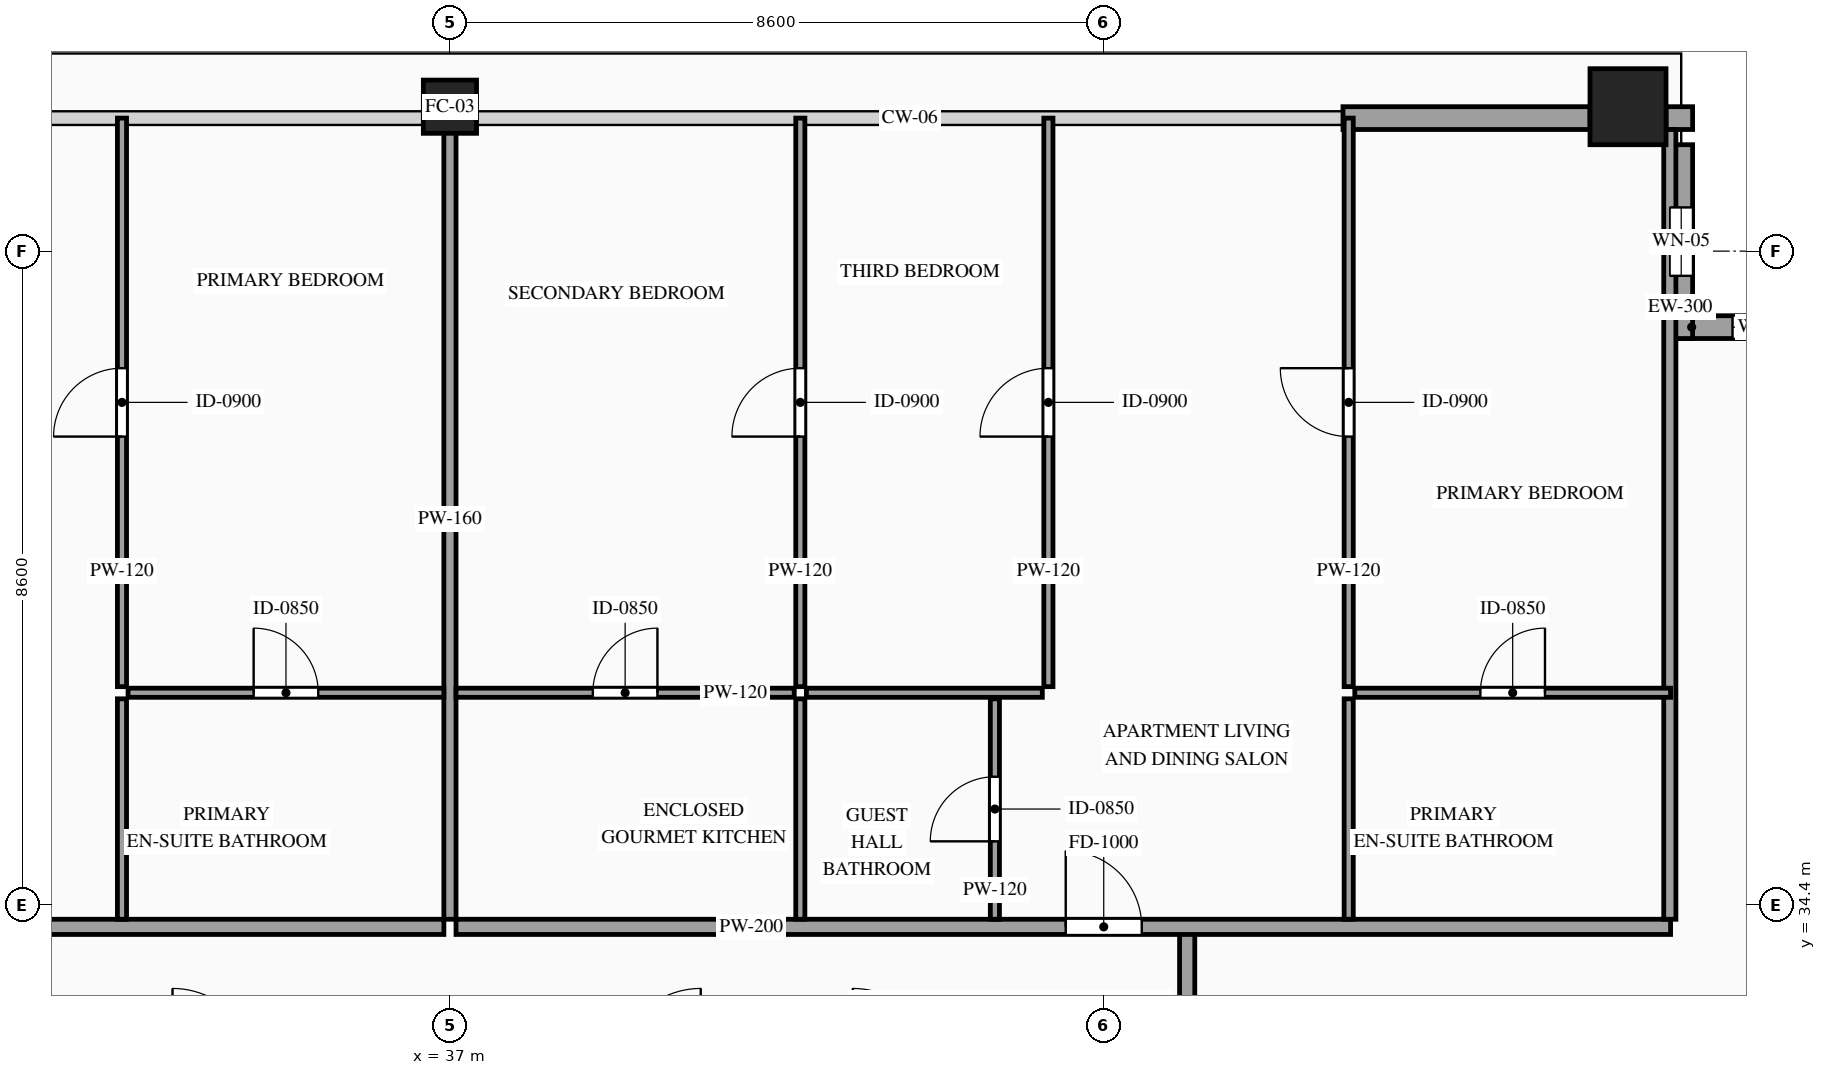
"""IFC4 building model, lengths in metres.
Left out: names, types, materials, properties, quantities, classifications, styles, units other than length and angle.
Written with IfcOpenShell. Run it as: python <this file> out.ifc"""

import sys

from ifc_helpers import new_model, si_unit, direction, frame, frame_2d, origin, origin_2d, place, context, subcontext, project, spatial, rectangle, hollow_rectangle, extrude, source, transform, mapped, element, fill, save


model = new_model("IFC4")
c1 = context("Model", 3, precision=1e-05, world=origin(), true_north=direction((0.0, 1.0)))
c2 = subcontext(c1, "Body", "Model", "MODEL_VIEW")
j1 = project(units=[si_unit("LENGTHUNIT", "METRE"), si_unit("PLANEANGLEUNIT", "RADIAN")], contexts=[c1])
p1 = place(None, origin())
s1 = spatial("IfcSite", under=j1, at=p1, CompositionType="ELEMENT")
p2 = place(p1, origin())
s2 = spatial("IfcBuilding", under=s1, at=p2, CompositionType="ELEMENT")
p3 = place(p2, frame((0.0, 0.0, 303.1)))
s3 = spatial("IfcBuildingStorey", under=s2, at=p3, CompositionType="ELEMENT", Elevation=303.1)
m1 = source(origin(), c2, "Body", "SweptSolid", [
    extrude(hollow_rectangle(XDim=0.7, YDim=0.7, WallThickness=0.032, at=origin_2d()), origin(), (0.0, 0.0, 1.0), 3.5),
])
p4 = place(p3, frame((37.0, 44.9, 0.0), z_axis=(0.0, 0.0, 1.0), x_axis=(1.0, 0.0, 0.0)))
e1 = element("IfcColumn", 1, at=p4, inside=s3, PredefinedType="COLUMN", context=c2, shape_type="MappedRepresentation", body=[
    mapped(m1, transform((0.0, 0.0, 0.0), scale=1.0)),
])
m2 = source(origin(), c2, "Body", "SweptSolid", [
    extrude(hollow_rectangle(XDim=1.0, YDim=1.0, WallThickness=0.048, at=origin_2d()), origin(), (0.0, 0.0, 1.0), 3.5),
])
p5 = place(p3, frame((52.5, 44.9, 0.0), z_axis=(0.0, 0.0, 1.0), x_axis=(1.0, 0.0, 0.0)))
e2 = element("IfcColumn", 2, at=p5, inside=s3, PredefinedType="COLUMN", context=c2, shape_type="MappedRepresentation", body=[
    mapped(m2, transform((0.0, 0.0, 0.0), scale=1.0)),
])
p6 = place(p3, frame((55.6, 42.0, 0.0), z_axis=(0.0, 0.0, 1.0), x_axis=(-1.0, 0.0, 0.0)))
e3 = element("IfcWall", 3, at=p6, inside=s3, PredefinedType="SOLIDWALL", context=c2, shape_type="SweptSolid", body=[
    extrude(rectangle(XDim=2.55, YDim=0.3, at=frame_2d((1.275, 0.0))), origin(), (0.0, 0.0, 1.0), 3.22),
])
p7 = place(p6, frame((0.825, 0.0, 0.75)))
e4 = element("IfcOpeningElement", 4, at=p7, cuts=e3, PredefinedType="OPENING", context=c2, shape_type="SweptSolid", body=[
    extrude(rectangle(XDim=0.9, YDim=1.5, at=frame_2d((0.45, 0.75))), frame((0.0, 0.165, 0.0), z_axis=(0.0, -1.0, 0.0), x_axis=(1.0, 0.0, 0.0)), (0.0, 0.0, 1.0), 0.33),
])
p8 = place(p3, frame((53.2, 41.85, 0.0), z_axis=(0.0, 0.0, 1.0), x_axis=(0.0, 1.0, 0.0)))
e5 = element("IfcWall", 5, at=p8, inside=s3, PredefinedType="SOLIDWALL", context=c2, shape_type="SweptSolid", body=[
    extrude(rectangle(XDim=2.55, YDim=0.3, at=frame_2d((1.275, 0.0))), origin(), (0.0, 0.0, 1.0), 3.22),
])
p9 = place(p8, frame((0.825, 0.0, 0.75)))
e6 = element("IfcOpeningElement", 6, at=p9, cuts=e5, PredefinedType="OPENING", context=c2, shape_type="SweptSolid", body=[
    extrude(rectangle(XDim=0.9, YDim=1.5, at=frame_2d((0.45, 0.75))), frame((0.0, 0.165, 0.0), z_axis=(0.0, -1.0, 0.0), x_axis=(1.0, 0.0, 0.0)), (0.0, 0.0, 1.0), 0.33),
])
m3 = source(origin(), c2, "Body", "SweptSolid", [
    extrude(rectangle(XDim=0.35, YDim=0.3, at=frame_2d((0.175, 0.0))), origin(), (0.0, 0.0, 1.0), 3.22),
])
p10 = place(p3, frame((53.0, 44.75, 0.0), z_axis=(0.0, 0.0, 1.0), x_axis=(1.0, 0.0, 0.0)))
e7 = element("IfcWall", 7, at=p10, inside=s3, PredefinedType="SOLIDWALL", context=c2, shape_type="MappedRepresentation", body=[
    mapped(m3, transform((0.0, 0.0, 0.0), scale=1.0)),
])
m4 = source(origin(), c2, "Body", "SweptSolid", [
    extrude(rectangle(XDim=3.25, YDim=0.3, at=frame_2d((1.625, 0.0))), origin(), (0.0, 0.0, 1.0), 2.825),
])
p11 = place(p3, frame((48.75, 44.75, 0.0), z_axis=(0.0, 0.0, 1.0), x_axis=(1.0, 0.0, 0.0)))
e8 = element("IfcWall", 8, at=p11, inside=s3, PredefinedType="SOLIDWALL", context=c2, shape_type="MappedRepresentation", body=[
    mapped(m4, transform((0.0, 0.0, 0.0), scale=1.0)),
])
m5 = source(origin(), c2, "Body", "SweptSolid", [
    extrude(rectangle(XDim=1.7, YDim=0.2, at=frame_2d((0.85, 0.0))), origin(), (0.0, 0.0, 1.0), 3.22),
])
p12 = place(p3, frame((46.7, 32.35, 0.0), z_axis=(0.0, 0.0, 1.0), x_axis=(0.0, 1.0, 0.0)))
e9 = element("IfcWall", 9, at=p12, inside=s3, PredefinedType="PARTITIONING", context=c2, shape_type="MappedRepresentation", body=[
    mapped(m5, transform((0.0, 0.0, 0.0), scale=1.0)),
])
p13 = place(p3, frame((20.94, 34.11, 0.0), z_axis=(0.0, 0.0, 1.0), x_axis=(1.0, 0.0, 0.0)))
e10 = element("IfcWall", 10, at=p13, inside=s3, PredefinedType="PARTITIONING", context=c2, shape_type="SweptSolid", body=[
    extrude(rectangle(XDim=15.98, YDim=0.2, at=frame_2d((7.99, 0.0))), origin(), (0.0, 0.0, 1.0), 3.22),
])
p14 = place(p13, frame((9.269, 0.0, 0.0)))
e11 = element("IfcOpeningElement", 11, at=p14, cuts=e10, PredefinedType="OPENING", context=c2, shape_type="SweptSolid", body=[
    extrude(rectangle(XDim=1.0, YDim=2.2, at=frame_2d((0.5, 1.1))), frame((0.0, 0.115, 0.0), z_axis=(0.0, -1.0, 0.0), x_axis=(1.0, 0.0, 0.0)), (0.0, 0.0, 1.0), 0.23),
])
m6 = source(origin(), c2, "Body", "SweptSolid", [
    extrude(rectangle(XDim=10.54, YDim=0.16, at=frame_2d((5.27, 0.0))), origin(), (0.0, 0.0, 1.0), 2.727),
])
p15 = place(p3, frame((37.0, 34.21, 0.0), z_axis=(0.0, 0.0, 1.0), x_axis=(0.0, 1.0, 0.0)))
e12 = element("IfcWall", 12, at=p15, inside=s3, PredefinedType="PARTITIONING", context=c2, shape_type="MappedRepresentation", body=[
    mapped(m6, transform((0.0, 0.0, 0.0), scale=1.0)),
])
p16 = place(p3, frame((32.765, 37.19, 0.0), z_axis=(0.0, 0.0, 1.0), x_axis=(1.0, 0.0, 0.0)))
e13 = element("IfcWall", 13, at=p16, inside=s3, PredefinedType="PARTITIONING", context=c2, shape_type="SweptSolid", body=[
    extrude(rectangle(XDim=4.155, YDim=0.12, at=frame_2d((2.078, 0.0))), origin(), (0.0, 0.0, 1.0), 3.22),
])
p17 = place(p16, frame((1.653, 0.0, 0.0)))
e14 = element("IfcOpeningElement", 14, at=p17, cuts=e13, PredefinedType="OPENING", context=c2, shape_type="SweptSolid", body=[
    extrude(rectangle(XDim=0.85, YDim=2.1, at=frame_2d((0.425, 1.05))), frame((0.0, 0.075, 0.0), z_axis=(0.0, -1.0, 0.0), x_axis=(1.0, 0.0, 0.0)), (0.0, 0.0, 1.0), 0.15),
])
m7 = source(origin(), c2, "Body", "SweptSolid", [
    extrude(rectangle(XDim=2.9, YDim=0.12, at=frame_2d((1.45, 0.0))), origin(), (0.0, 0.0, 1.0), 3.22),
])
p18 = place(p3, frame((32.685, 34.21, 0.0), z_axis=(0.0, 0.0, 1.0), x_axis=(0.0, 1.0, 0.0)))
e15 = element("IfcWall", 15, at=p18, inside=s3, PredefinedType="PARTITIONING", context=c2, shape_type="MappedRepresentation", body=[
    mapped(m7, transform((0.0, 0.0, 0.0), scale=1.0)),
])
p19 = place(p3, frame((32.685, 37.27, 0.0), z_axis=(0.0, 0.0, 1.0), x_axis=(0.0, 1.0, 0.0)))
e16 = element("IfcWall", 16, at=p19, inside=s3, PredefinedType="PARTITIONING", context=c2, shape_type="SweptSolid", body=[
    extrude(rectangle(XDim=7.48, YDim=0.12, at=frame_2d((3.74, 0.0))), origin(), (0.0, 0.0, 1.0), 3.22),
])
p20 = place(p19, frame((3.29, 0.0, 0.0)))
e17 = element("IfcOpeningElement", 17, at=p20, cuts=e16, PredefinedType="OPENING", context=c2, shape_type="SweptSolid", body=[
    extrude(rectangle(XDim=0.9, YDim=2.15, at=frame_2d((0.45, 1.075))), frame((0.0, 0.075, 0.0), z_axis=(0.0, -1.0, 0.0), x_axis=(1.0, 0.0, 0.0)), (0.0, 0.0, 1.0), 0.15),
])
p21 = place(p3, frame((37.08, 34.11, 0.0), z_axis=(0.0, 0.0, 1.0), x_axis=(1.0, 0.0, 0.0)))
e18 = element("IfcWall", 18, at=p21, inside=s3, PredefinedType="PARTITIONING", context=c2, shape_type="SweptSolid", body=[
    extrude(rectangle(XDim=15.98, YDim=0.2, at=frame_2d((7.99, 0.0))), origin(), (0.0, 0.0, 1.0), 3.22),
])
p22 = place(p21, frame((8.022, 0.0, 0.0)))
e19 = element("IfcOpeningElement", 19, at=p22, cuts=e18, PredefinedType="OPENING", context=c2, shape_type="SweptSolid", body=[
    extrude(rectangle(XDim=1.0, YDim=2.2, at=frame_2d((0.5, 1.1))), frame((0.0, 0.115, 0.0), z_axis=(0.0, -1.0, 0.0), x_axis=(1.0, 0.0, 0.0)), (0.0, 0.0, 1.0), 0.23),
])
m8 = source(origin(), c2, "Body", "SweptSolid", [
    extrude(rectangle(XDim=10.39, YDim=0.16, at=frame_2d((5.195, 0.0))), origin(), (0.0, 0.0, 1.0), 3.22),
])
p23 = place(p3, frame((53.05, 34.21, 0.0), z_axis=(0.0, 0.0, 1.0), x_axis=(0.0, 1.0, 0.0)))
e20 = element("IfcWall", 20, at=p23, inside=s3, PredefinedType="PARTITIONING", context=c2, shape_type="MappedRepresentation", body=[
    mapped(m8, transform((0.0, 0.0, 0.0), scale=1.0)),
])
p24 = place(p3, frame((37.08, 37.19, 0.0), z_axis=(0.0, 0.0, 1.0), x_axis=(1.0, 0.0, 0.0)))
e21 = element("IfcWall", 21, at=p24, inside=s3, PredefinedType="PARTITIONING", context=c2, shape_type="SweptSolid", body=[
    extrude(rectangle(XDim=4.45, YDim=0.12, at=frame_2d((2.225, 0.0))), origin(), (0.0, 0.0, 1.0), 3.22),
])
p25 = place(p24, frame((1.8, 0.0, 0.0)))
e22 = element("IfcOpeningElement", 22, at=p25, cuts=e21, PredefinedType="OPENING", context=c2, shape_type="SweptSolid", body=[
    extrude(rectangle(XDim=0.85, YDim=2.1, at=frame_2d((0.425, 1.05))), frame((0.0, 0.075, 0.0), z_axis=(0.0, -1.0, 0.0), x_axis=(1.0, 0.0, 0.0)), (0.0, 0.0, 1.0), 0.15),
])
p26 = place(p3, frame((41.61, 34.21, 0.0), z_axis=(0.0, 0.0, 1.0), x_axis=(0.0, 1.0, 0.0)))
e23 = element("IfcWall", 23, at=p26, inside=s3, PredefinedType="PARTITIONING", context=c2, shape_type="MappedRepresentation", body=[
    mapped(m7, transform((0.0, 0.0, 0.0), scale=1.0)),
])
p27 = place(p3, frame((44.17, 34.21, 0.0), z_axis=(0.0, 0.0, 1.0), x_axis=(0.0, 1.0, 0.0)))
e24 = element("IfcWall", 24, at=p27, inside=s3, PredefinedType="PARTITIONING", context=c2, shape_type="SweptSolid", body=[
    extrude(rectangle(XDim=2.9, YDim=0.12, at=frame_2d((1.45, 0.0))), origin(), (0.0, 0.0, 1.0), 3.22),
])
p28 = place(p27, frame((1.025, 0.0, 0.0)))
e25 = element("IfcOpeningElement", 25, at=p28, cuts=e24, PredefinedType="OPENING", context=c2, shape_type="SweptSolid", body=[
    extrude(rectangle(XDim=0.85, YDim=2.1, at=frame_2d((0.425, 1.05))), frame((0.0, 0.075, 0.0), z_axis=(0.0, -1.0, 0.0), x_axis=(1.0, 0.0, 0.0)), (0.0, 0.0, 1.0), 0.15),
])
p29 = place(p3, frame((48.905, 37.19, 0.0), z_axis=(0.0, 0.0, 1.0), x_axis=(1.0, 0.0, 0.0)))
e26 = element("IfcWall", 26, at=p29, inside=s3, PredefinedType="PARTITIONING", context=c2, shape_type="SweptSolid", body=[
    extrude(rectangle(XDim=4.155, YDim=0.12, at=frame_2d((2.078, 0.0))), origin(), (0.0, 0.0, 1.0), 3.22),
])
p30 = place(p29, frame((1.653, 0.0, 0.0)))
e27 = element("IfcOpeningElement", 27, at=p30, cuts=e26, PredefinedType="OPENING", context=c2, shape_type="SweptSolid", body=[
    extrude(rectangle(XDim=0.85, YDim=2.1, at=frame_2d((0.425, 1.05))), frame((0.0, 0.075, 0.0), z_axis=(0.0, -1.0, 0.0), x_axis=(1.0, 0.0, 0.0)), (0.0, 0.0, 1.0), 0.15),
])
p31 = place(p3, frame((48.825, 34.21, 0.0), z_axis=(0.0, 0.0, 1.0), x_axis=(0.0, 1.0, 0.0)))
e28 = element("IfcWall", 28, at=p31, inside=s3, PredefinedType="PARTITIONING", context=c2, shape_type="MappedRepresentation", body=[
    mapped(m7, transform((0.0, 0.0, 0.0), scale=1.0)),
])
p32 = place(p3, frame((41.61, 37.27, 0.0), z_axis=(0.0, 0.0, 1.0), x_axis=(0.0, 1.0, 0.0)))
e29 = element("IfcWall", 29, at=p32, inside=s3, PredefinedType="PARTITIONING", context=c2, shape_type="SweptSolid", body=[
    extrude(rectangle(XDim=7.48, YDim=0.12, at=frame_2d((3.74, 0.0))), origin(), (0.0, 0.0, 1.0), 3.22),
])
p33 = place(p32, frame((3.29, 0.0, 0.0)))
e30 = element("IfcOpeningElement", 30, at=p33, cuts=e29, PredefinedType="OPENING", context=c2, shape_type="SweptSolid", body=[
    extrude(rectangle(XDim=0.9, YDim=2.15, at=frame_2d((0.45, 1.075))), frame((0.0, 0.075, 0.0), z_axis=(0.0, -1.0, 0.0), x_axis=(1.0, 0.0, 0.0)), (0.0, 0.0, 1.0), 0.15),
])
p34 = place(p3, frame((48.825, 37.27, 0.0), z_axis=(0.0, 0.0, 1.0), x_axis=(0.0, 1.0, 0.0)))
e31 = element("IfcWall", 31, at=p34, inside=s3, PredefinedType="PARTITIONING", context=c2, shape_type="SweptSolid", body=[
    extrude(rectangle(XDim=7.48, YDim=0.12, at=frame_2d((3.74, 0.0))), origin(), (0.0, 0.0, 1.0), 3.22),
])
p35 = place(p34, frame((3.29, 0.0, 0.0)))
e32 = element("IfcOpeningElement", 32, at=p35, cuts=e31, PredefinedType="OPENING", context=c2, shape_type="SweptSolid", body=[
    extrude(rectangle(XDim=0.9, YDim=2.15, at=frame_2d((0.45, 1.075))), frame((0.0, 0.075, 0.0), z_axis=(0.0, -1.0, 0.0), x_axis=(1.0, 0.0, 0.0)), (0.0, 0.0, 1.0), 0.15),
])
m9 = source(origin(), c2, "Body", "SweptSolid", [
    extrude(rectangle(XDim=3.104, YDim=0.12, at=frame_2d((1.552, 0.0))), origin(), (0.0, 0.0, 1.0), 3.22),
])
p36 = place(p3, frame((41.69, 37.19, 0.0), z_axis=(0.0, 0.0, 1.0), x_axis=(1.0, 0.0, 0.0)))
e33 = element("IfcWall", 33, at=p36, inside=s3, PredefinedType="PARTITIONING", context=c2, shape_type="MappedRepresentation", body=[
    mapped(m9, transform((0.0, 0.0, 0.0), scale=1.0)),
])
p37 = place(p3, frame((44.874, 37.27, 0.0), z_axis=(0.0, 0.0, 1.0), x_axis=(0.0, 1.0, 0.0)))
e34 = element("IfcWall", 34, at=p37, inside=s3, PredefinedType="PARTITIONING", context=c2, shape_type="SweptSolid", body=[
    extrude(rectangle(XDim=7.48, YDim=0.12, at=frame_2d((3.74, 0.0))), origin(), (0.0, 0.0, 1.0), 3.22),
])
p38 = place(p37, frame((3.29, 0.0, 0.0)))
e35 = element("IfcOpeningElement", 35, at=p38, cuts=e34, PredefinedType="OPENING", context=c2, shape_type="SweptSolid", body=[
    extrude(rectangle(XDim=0.9, YDim=2.15, at=frame_2d((0.45, 1.075))), frame((0.0, 0.075, 0.0), z_axis=(0.0, -1.0, 0.0), x_axis=(1.0, 0.0, 0.0)), (0.0, 0.0, 1.0), 0.15),
])
m10 = source(origin(), c2, "Body", "SweptSolid", [
    extrude(rectangle(XDim=0.9, YDim=1.5, at=frame_2d((0.45, 0.75))), frame((0.0, 0.03, 0.0), z_axis=(0.0, -1.0, 0.0), x_axis=(1.0, 0.0, 0.0)), (0.0, 0.0, 1.0), 0.06),
])
p39 = place(p7, origin())
e36 = element("IfcWindow", 36, at=p39, inside=s3, PartitioningType="SINGLE_PANEL", PredefinedType="WINDOW", context=c2, shape_type="MappedRepresentation", body=[
    mapped(m10, transform((0.0, 0.0, 0.0), scale=1.0)),
])
fill(e4, e36)
p40 = place(p9, origin())
e37 = element("IfcWindow", 37, at=p40, inside=s3, PartitioningType="SINGLE_PANEL", PredefinedType="WINDOW", context=c2, shape_type="MappedRepresentation", body=[
    mapped(m10, transform((0.0, 0.0, 0.0), scale=1.0)),
])
fill(e6, e37)
m11 = source(origin(), c2, "Body", "SweptSolid", [
    extrude(rectangle(XDim=0.85, YDim=2.1, at=frame_2d((0.425, 1.05))), frame((0.0, 0.025, 0.0), z_axis=(0.0, -1.0, 0.0), x_axis=(1.0, 0.0, 0.0)), (0.0, 0.0, 1.0), 0.05),
])
p41 = place(p17, origin())
e38 = element("IfcDoor", 38, at=p41, inside=s3, OperationType="SINGLE_SWING_LEFT", PredefinedType="DOOR", context=c2, shape_type="MappedRepresentation", body=[
    mapped(m11, transform((0.0, 0.0, 0.0), scale=1.0)),
])
fill(e14, e38)
m12 = source(origin(), c2, "Body", "SweptSolid", [
    extrude(rectangle(XDim=0.9, YDim=2.15, at=frame_2d((0.45, 1.075))), frame((0.0, 0.025, 0.0), z_axis=(0.0, -1.0, 0.0), x_axis=(1.0, 0.0, 0.0)), (0.0, 0.0, 1.0), 0.05),
])
p42 = place(p20, origin())
e39 = element("IfcDoor", 39, at=p42, inside=s3, OperationType="SINGLE_SWING_LEFT", PredefinedType="DOOR", context=c2, shape_type="MappedRepresentation", body=[
    mapped(m12, transform((0.0, 0.0, 0.0), scale=1.0)),
])
fill(e17, e39)
m13 = source(origin(), c2, "Body", "SweptSolid", [
    extrude(rectangle(XDim=1.0, YDim=2.2, at=frame_2d((0.5, 1.1))), frame((0.0, 0.025, 0.0), z_axis=(0.0, -1.0, 0.0), x_axis=(1.0, 0.0, 0.0)), (0.0, 0.0, 1.0), 0.05),
])
p43 = place(p22, origin())
e40 = element("IfcDoor", 40, at=p43, inside=s3, OperationType="SINGLE_SWING_LEFT", PredefinedType="DOOR", context=c2, shape_type="MappedRepresentation", body=[
    mapped(m13, transform((0.0, 0.0, 0.0), scale=1.0)),
])
fill(e19, e40)
p44 = place(p25, origin())
e41 = element("IfcDoor", 41, at=p44, inside=s3, OperationType="SINGLE_SWING_RIGHT", PredefinedType="DOOR", context=c2, shape_type="MappedRepresentation", body=[
    mapped(m11, transform((0.0, 0.0, 0.0), scale=1.0)),
])
fill(e22, e41)
p45 = place(p28, origin())
e42 = element("IfcDoor", 42, at=p45, inside=s3, OperationType="SINGLE_SWING_LEFT", PredefinedType="DOOR", context=c2, shape_type="MappedRepresentation", body=[
    mapped(m11, transform((0.0, 0.0, 0.0), scale=1.0)),
])
fill(e25, e42)
p46 = place(p30, origin())
e43 = element("IfcDoor", 43, at=p46, inside=s3, OperationType="SINGLE_SWING_RIGHT", PredefinedType="DOOR", context=c2, shape_type="MappedRepresentation", body=[
    mapped(m11, transform((0.0, 0.0, 0.0), scale=1.0)),
])
fill(e27, e43)
p47 = place(p33, origin())
e44 = element("IfcDoor", 44, at=p47, inside=s3, OperationType="SINGLE_SWING_LEFT", PredefinedType="DOOR", context=c2, shape_type="MappedRepresentation", body=[
    mapped(m12, transform((0.0, 0.0, 0.0), scale=1.0)),
])
fill(e30, e44)
p48 = place(p35, origin())
e45 = element("IfcDoor", 45, at=p48, inside=s3, OperationType="SINGLE_SWING_RIGHT", PredefinedType="DOOR", context=c2, shape_type="MappedRepresentation", body=[
    mapped(m12, transform((0.0, 0.0, 0.0), scale=1.0)),
])
fill(e32, e45)
p49 = place(p38, origin())
e46 = element("IfcDoor", 46, at=p49, inside=s3, OperationType="SINGLE_SWING_LEFT", PredefinedType="DOOR", context=c2, shape_type="MappedRepresentation", body=[
    mapped(m12, transform((0.0, 0.0, 0.0), scale=1.0)),
])
fill(e35, e46)
save(model, sys.argv[1])
